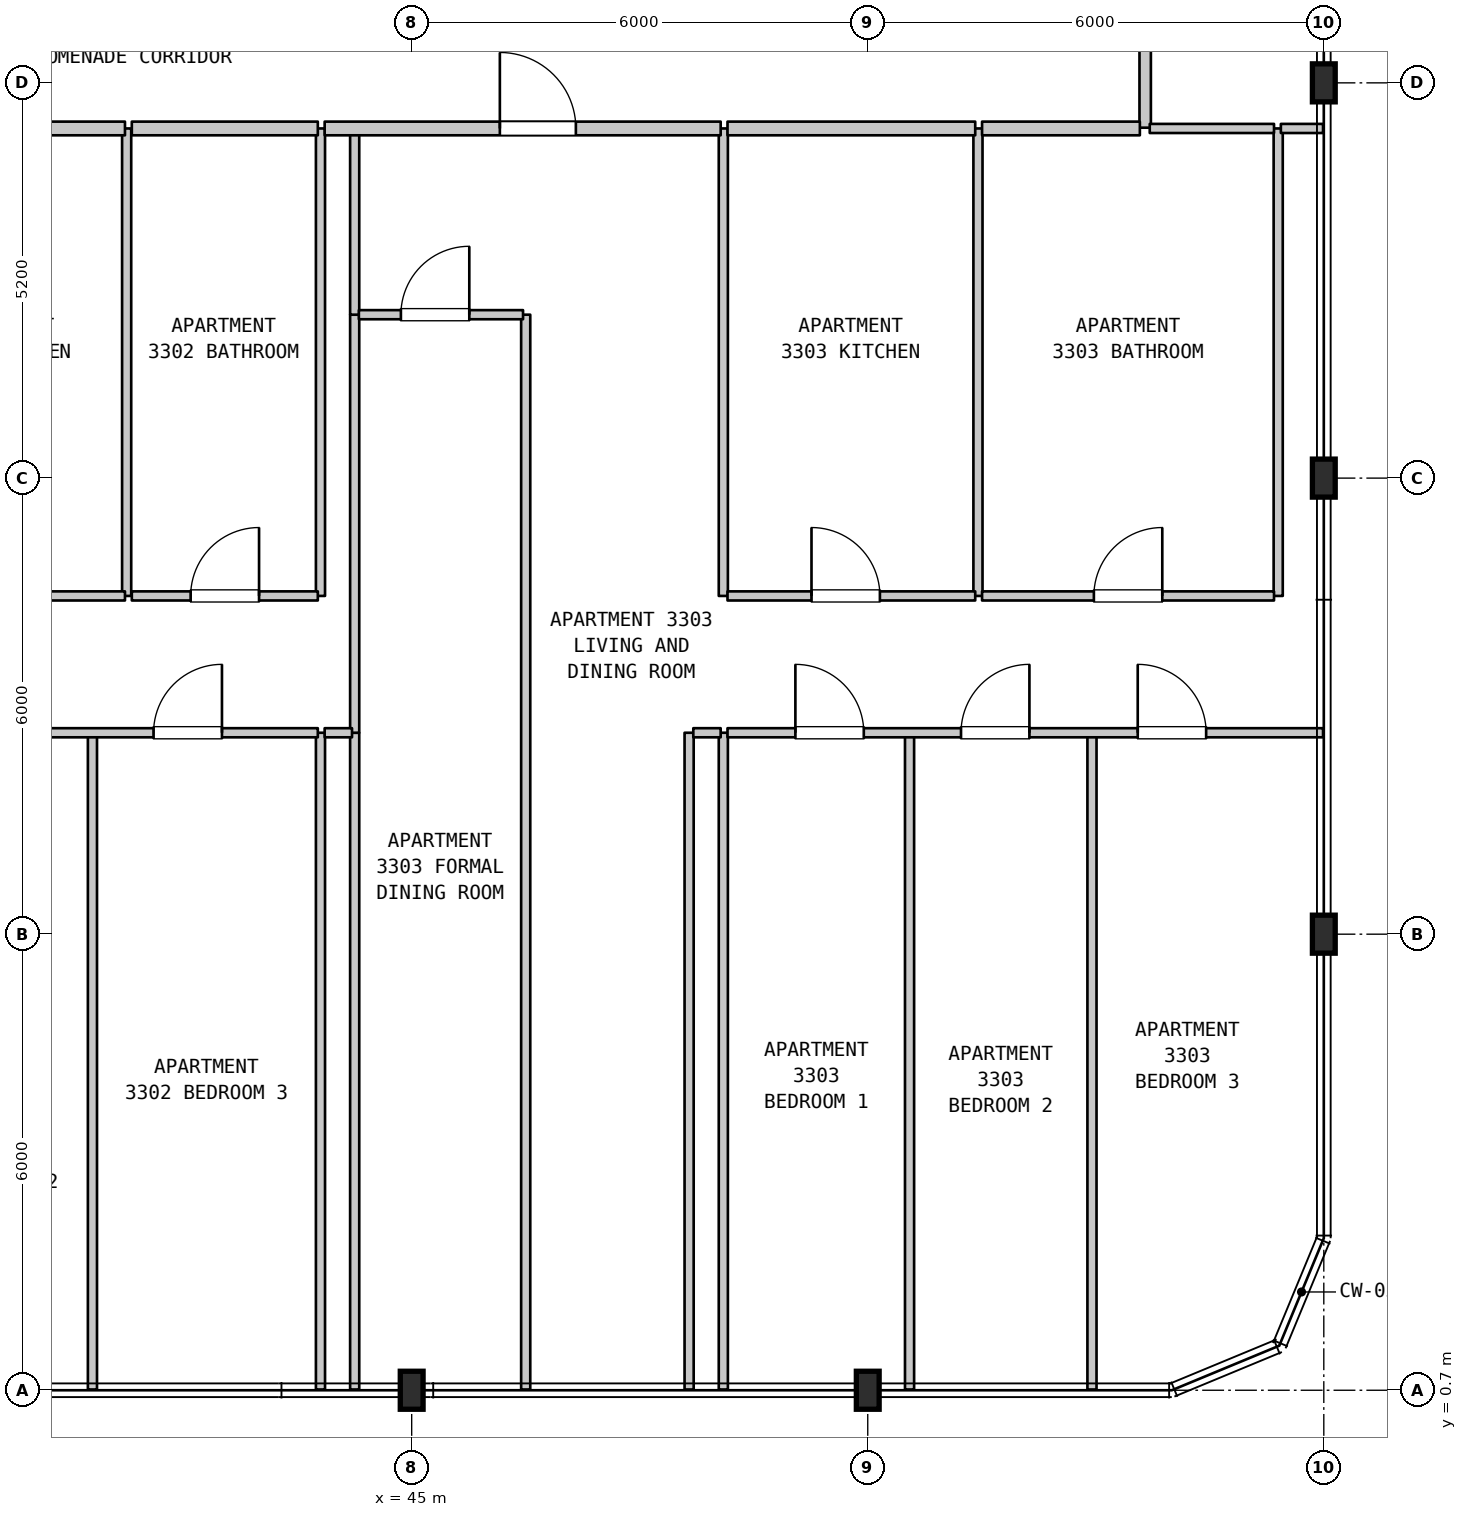
"""IFC4 building model, lengths in metres.
Left out: names, types, materials, properties, quantities, classifications, styles, units other than length and angle.
Written with IfcOpenShell. Run it as: python <this file> out.ifc"""

import sys

from ifc_helpers import new_model, si_unit, direction, frame, frame_2d, origin, origin_2d, place, context, subcontext, project, spatial, rectangle, i_section, extrude, element, fill, save


model = new_model("IFC4")
c1 = context("Model", 3, precision=1e-05, world=origin(), true_north=direction((0.0, 1.0)))
c2 = subcontext(c1, "Body", "Model", "MODEL_VIEW")
j1 = project(units=[si_unit("LENGTHUNIT", "METRE"), si_unit("PLANEANGLEUNIT", "RADIAN")], contexts=[c1])
p1 = place(None, origin())
s1 = spatial("IfcSite", under=j1, at=p1, CompositionType="ELEMENT")
p2 = place(p1, origin())
s2 = spatial("IfcBuilding", under=s1, at=p2, CompositionType="ELEMENT")
p3 = place(p2, frame((0.0, 0.0, 137.2)))
s3 = spatial("IfcBuildingStorey", under=s2, at=p3, CompositionType="ELEMENT", Elevation=137.2)
for number, where, z_axis, x_axis in (
    (1, (45.0, 0.7, 0.0), (0.0, 0.0, 1.0), (1.0, 0.0, 0.0)),
    (2, (51.0, 0.7, 0.0), (0.0, 0.0, 1.0), (1.0, 0.0, 0.0)),
    (3, (57.0, 6.7, 0.0), (0.0, 0.0, 1.0), (1.0, 0.0, 0.0)),
    (4, (57.0, 12.7, 0.0), (0.0, 0.0, 1.0), (1.0, 0.0, 0.0)),
    (5, (57.0, 17.9, 0.0), (0.0, 0.0, 1.0), (1.0, 0.0, 0.0)),
):
    element("IfcColumn", number, at=place(p3, frame(where, z_axis=z_axis, x_axis=x_axis)), inside=s3, PredefinedType="COLUMN", context=c2, shape_type="SweptSolid", body=[
        extrude(i_section(OverallWidth=0.3, OverallDepth=0.5, WebThickness=0.014, FlangeThickness=0.028, FilletRadius=0.027, at=origin_2d()), origin(), (0.0, 0.0, 1.0), 3.7),
    ])
p4 = place(p3, frame((40.8, 0.71, 0.0), z_axis=(0.0, 0.0, 1.0), x_axis=(0.0, 1.0, 0.0)))
e6 = element("IfcWall", 6, at=p4, inside=s3, PredefinedType="PARTITIONING", context=c2, shape_type="SweptSolid", body=[
    extrude(rectangle(XDim=8.64, YDim=0.12, at=frame_2d((4.32, 0.0))), origin(), (0.0, 0.0, 1.0), 3.385),
])
p5 = place(p3, frame((41.25, 11.15, 0.0), z_axis=(0.0, 0.0, 1.0), x_axis=(0.0, 1.0, 0.0)))
e7 = element("IfcWall", 7, at=p5, inside=s3, PredefinedType="PARTITIONING", context=c2, shape_type="SweptSolid", body=[
    extrude(rectangle(XDim=6.15, YDim=0.12, at=frame_2d((3.075, 0.0))), origin(), (0.0, 0.0, 1.0), 3.385),
])
p6 = place(p3, frame((43.8, 0.71, 0.0), z_axis=(0.0, 0.0, 1.0), x_axis=(0.0, 1.0, 0.0)))
e8 = element("IfcWall", 8, at=p6, inside=s3, PredefinedType="PARTITIONING", context=c2, shape_type="SweptSolid", body=[
    extrude(rectangle(XDim=8.64, YDim=0.12, at=frame_2d((4.32, 0.0))), origin(), (0.0, 0.0, 1.0), 3.385),
])
p7 = place(p3, frame((43.8, 11.15, 0.0), z_axis=(0.0, 0.0, 1.0), x_axis=(0.0, 1.0, 0.0)))
e9 = element("IfcWall", 9, at=p7, inside=s3, PredefinedType="PARTITIONING", context=c2, shape_type="SweptSolid", body=[
    extrude(rectangle(XDim=6.15, YDim=0.12, at=frame_2d((3.075, 0.0))), origin(), (0.0, 0.0, 1.0), 3.385),
])
p8 = place(p3, frame((44.25, 0.71, 0.0), z_axis=(0.0, 0.0, 1.0), x_axis=(0.0, 1.0, 0.0)))
e10 = element("IfcWall", 10, at=p8, inside=s3, PredefinedType="PARTITIONING", context=c2, shape_type="SweptSolid", body=[
    extrude(rectangle(XDim=8.64, YDim=0.12, at=frame_2d((4.32, 0.0))), origin(), (0.0, 0.0, 1.0), 3.385),
])
p9 = place(p3, frame((44.25, 9.35, 0.0), z_axis=(0.0, 0.0, 1.0), x_axis=(0.0, 1.0, 0.0)))
e11 = element("IfcWall", 11, at=p9, inside=s3, PredefinedType="PARTITIONING", context=c2, shape_type="SweptSolid", body=[
    extrude(rectangle(XDim=5.5, YDim=0.12, at=frame_2d((2.75, 0.0))), origin(), (0.0, 0.0, 1.0), 3.385),
])
p10 = place(p3, frame((44.25, 14.85, 0.0), z_axis=(0.0, 0.0, 1.0), x_axis=(0.0, 1.0, 0.0)))
e12 = element("IfcWall", 12, at=p10, inside=s3, PredefinedType="PARTITIONING", context=c2, shape_type="SweptSolid", body=[
    extrude(rectangle(XDim=2.45, YDim=0.12, at=frame_2d((1.225, 0.0))), origin(), (0.0, 0.0, 1.0), 3.385),
])
p11 = place(p3, frame((46.5, 0.71, 0.0), z_axis=(0.0, 0.0, 1.0), x_axis=(0.0, 1.0, 0.0)))
e13 = element("IfcWall", 13, at=p11, inside=s3, PredefinedType="PARTITIONING", context=c2, shape_type="SweptSolid", body=[
    extrude(rectangle(XDim=14.14, YDim=0.12, at=frame_2d((7.07, 0.0))), origin(), (0.0, 0.0, 1.0), 3.385),
])
for number, where, z_axis, x_axis in (
    (14, (48.65, 0.71, 0.0), (0.0, 0.0, 1.0), (0.0, 1.0, 0.0)),
    (15, (49.1, 0.71, 0.0), (0.0, 0.0, 1.0), (0.0, 1.0, 0.0)),
):
    element("IfcWall", number, at=place(p3, frame(where, z_axis=z_axis, x_axis=x_axis)), inside=s3, PredefinedType="PARTITIONING", context=c2, shape_type="SweptSolid", body=[
        extrude(rectangle(XDim=8.64, YDim=0.12, at=frame_2d((4.32, 0.0))), origin(), (0.0, 0.0, 1.0), 3.385),
    ])
p12 = place(p3, frame((49.1, 11.15, 0.0), z_axis=(0.0, 0.0, 1.0), x_axis=(0.0, 1.0, 0.0)))
e16 = element("IfcWall", 16, at=p12, inside=s3, PredefinedType="PARTITIONING", context=c2, shape_type="SweptSolid", body=[
    extrude(rectangle(XDim=6.15, YDim=0.12, at=frame_2d((3.075, 0.0))), origin(), (0.0, 0.0, 1.0), 3.385),
])
p13 = place(p3, frame((51.55, 0.71, 0.0), z_axis=(0.0, 0.0, 1.0), x_axis=(0.0, 1.0, 0.0)))
e17 = element("IfcWall", 17, at=p13, inside=s3, PredefinedType="PARTITIONING", context=c2, shape_type="SweptSolid", body=[
    extrude(rectangle(XDim=8.64, YDim=0.12, at=frame_2d((4.32, 0.0))), origin(), (0.0, 0.0, 1.0), 3.385),
])
p14 = place(p3, frame((52.45, 11.15, 0.0), z_axis=(0.0, 0.0, 1.0), x_axis=(0.0, 1.0, 0.0)))
e18 = element("IfcWall", 18, at=p14, inside=s3, PredefinedType="PARTITIONING", context=c2, shape_type="SweptSolid", body=[
    extrude(rectangle(XDim=6.15, YDim=0.12, at=frame_2d((3.075, 0.0))), origin(), (0.0, 0.0, 1.0), 3.385),
])
p15 = place(p3, frame((53.95, 0.71, 0.0), z_axis=(0.0, 0.0, 1.0), x_axis=(0.0, 1.0, 0.0)))
e19 = element("IfcWall", 19, at=p15, inside=s3, PredefinedType="PARTITIONING", context=c2, shape_type="SweptSolid", body=[
    extrude(rectangle(XDim=8.64, YDim=0.12, at=frame_2d((4.32, 0.0))), origin(), (0.0, 0.0, 1.0), 3.385),
])
p16 = place(p3, frame((54.65, 17.31, 0.0), z_axis=(0.0, 0.0, 1.0), x_axis=(0.0, 1.0, 0.0)))
e20 = element("IfcWall", 20, at=p16, inside=s3, PredefinedType="STANDARD", context=c2, shape_type="SweptSolid", body=[
    extrude(rectangle(XDim=2.19, YDim=0.15, at=frame_2d((1.095, 0.0))), origin(), (0.0, 0.0, 1.0), 3.385),
])
p17 = place(p3, frame((56.4, 11.15, 0.0), z_axis=(0.0, 0.0, 1.0), x_axis=(0.0, 1.0, 0.0)))
e21 = element("IfcWall", 21, at=p17, inside=s3, PredefinedType="PARTITIONING", context=c2, shape_type="SweptSolid", body=[
    extrude(rectangle(XDim=6.15, YDim=0.12, at=frame_2d((3.075, 0.0))), origin(), (0.0, 0.0, 1.0), 3.385),
])
p18 = place(p3, frame((34.795, 9.35, 0.0), z_axis=(0.0, 0.0, 1.0), x_axis=(1.0, 0.0, 0.0)))
e22 = element("IfcWall", 22, at=p18, inside=s3, PredefinedType="PARTITIONING", context=c2, shape_type="SweptSolid", body=[
    extrude(rectangle(XDim=8.97, YDim=0.12, at=frame_2d((4.485, 0.0))), origin(), (0.0, 0.0, 1.0), 3.385),
])
p19 = place(p18, frame((1.119, 0.0, 0.0)))
e23 = element("IfcOpeningElement", 23, at=p19, cuts=e22, PredefinedType="OPENING", context=c2, shape_type="SweptSolid", body=[
    extrude(rectangle(XDim=0.9, YDim=2.15, at=frame_2d((0.45, 1.075))), frame((0.0, 0.07, 0.0), z_axis=(0.0, -1.0, 0.0), x_axis=(1.0, 0.0, 0.0)), (0.0, 0.0, 1.0), 0.14),
])
p20 = place(p18, frame((3.962, 0.0, 0.0)))
e24 = element("IfcOpeningElement", 24, at=p20, cuts=e22, PredefinedType="OPENING", context=c2, shape_type="SweptSolid", body=[
    extrude(rectangle(XDim=0.9, YDim=2.15, at=frame_2d((0.45, 1.075))), frame((0.0, 0.07, 0.0), z_axis=(0.0, -1.0, 0.0), x_axis=(1.0, 0.0, 0.0)), (0.0, 0.0, 1.0), 0.14),
])
p21 = place(p18, frame((6.809, 0.0, 0.0)))
e25 = element("IfcOpeningElement", 25, at=p21, cuts=e22, PredefinedType="OPENING", context=c2, shape_type="SweptSolid", body=[
    extrude(rectangle(XDim=0.9, YDim=2.15, at=frame_2d((0.45, 1.075))), frame((0.0, 0.07, 0.0), z_axis=(0.0, -1.0, 0.0), x_axis=(1.0, 0.0, 0.0)), (0.0, 0.0, 1.0), 0.14),
])
p22 = place(p3, frame((43.855, 9.35, 0.0), z_axis=(0.0, 0.0, 1.0), x_axis=(1.0, 0.0, 0.0)))
e26 = element("IfcWall", 26, at=p22, inside=s3, PredefinedType="PARTITIONING", context=c2, shape_type="SweptSolid", body=[
    extrude(rectangle(XDim=0.36, YDim=0.12, at=frame_2d((0.18, 0.0))), origin(), (0.0, 0.0, 1.0), 3.385),
])
p23 = place(p3, frame((48.705, 9.35, 0.0), z_axis=(0.0, 0.0, 1.0), x_axis=(1.0, 0.0, 0.0)))
e27 = element("IfcWall", 27, at=p23, inside=s3, PredefinedType="PARTITIONING", context=c2, shape_type="SweptSolid", body=[
    extrude(rectangle(XDim=0.36, YDim=0.12, at=frame_2d((0.18, 0.0))), origin(), (0.0, 0.0, 1.0), 3.385),
])
p24 = place(p3, frame((49.155, 9.35, 0.0), z_axis=(0.0, 0.0, 1.0), x_axis=(1.0, 0.0, 0.0)))
e28 = element("IfcWall", 28, at=p24, inside=s3, PredefinedType="PARTITIONING", context=c2, shape_type="SweptSolid", body=[
    extrude(rectangle(XDim=7.835, YDim=0.12, at=frame_2d((3.917, 0.0))), origin(), (0.0, 0.0, 1.0), 3.385),
])
p25 = place(p24, frame((0.893, 0.0, 0.0)))
e29 = element("IfcOpeningElement", 29, at=p25, cuts=e28, PredefinedType="OPENING", context=c2, shape_type="SweptSolid", body=[
    extrude(rectangle(XDim=0.9, YDim=2.15, at=frame_2d((0.45, 1.075))), frame((0.0, 0.07, 0.0), z_axis=(0.0, -1.0, 0.0), x_axis=(1.0, 0.0, 0.0)), (0.0, 0.0, 1.0), 0.14),
])
p26 = place(p24, frame((3.072, 0.0, 0.0)))
e30 = element("IfcOpeningElement", 30, at=p26, cuts=e28, PredefinedType="OPENING", context=c2, shape_type="SweptSolid", body=[
    extrude(rectangle(XDim=0.9, YDim=2.15, at=frame_2d((0.45, 1.075))), frame((0.0, 0.07, 0.0), z_axis=(0.0, -1.0, 0.0), x_axis=(1.0, 0.0, 0.0)), (0.0, 0.0, 1.0), 0.14),
])
p27 = place(p24, frame((5.397, 0.0, 0.0)))
e31 = element("IfcOpeningElement", 31, at=p27, cuts=e28, PredefinedType="OPENING", context=c2, shape_type="SweptSolid", body=[
    extrude(rectangle(XDim=0.9, YDim=2.15, at=frame_2d((0.45, 1.075))), frame((0.0, 0.07, 0.0), z_axis=(0.0, -1.0, 0.0), x_axis=(1.0, 0.0, 0.0)), (0.0, 0.0, 1.0), 0.14),
])
p28 = place(p3, frame((37.995, 11.15, 0.0), z_axis=(0.0, 0.0, 1.0), x_axis=(1.0, 0.0, 0.0)))
e32 = element("IfcWall", 32, at=p28, inside=s3, PredefinedType="PARTITIONING", context=c2, shape_type="SweptSolid", body=[
    extrude(rectangle(XDim=3.233, YDim=0.12, at=frame_2d((1.616, 0.0))), origin(), (0.0, 0.0, 1.0), 3.385),
])
p29 = place(p28, frame((1.134, 0.0, 0.0)))
e33 = element("IfcOpeningElement", 33, at=p29, cuts=e32, PredefinedType="OPENING", context=c2, shape_type="SweptSolid", body=[
    extrude(rectangle(XDim=0.9, YDim=2.15, at=frame_2d((0.45, 1.075))), frame((0.0, 0.07, 0.0), z_axis=(0.0, -1.0, 0.0), x_axis=(1.0, 0.0, 0.0)), (0.0, 0.0, 1.0), 0.14),
])
p30 = place(p3, frame((41.318, 11.15, 0.0), z_axis=(0.0, 0.0, 1.0), x_axis=(1.0, 0.0, 0.0)))
e34 = element("IfcWall", 34, at=p30, inside=s3, PredefinedType="PARTITIONING", context=c2, shape_type="SweptSolid", body=[
    extrude(rectangle(XDim=2.447, YDim=0.12, at=frame_2d((1.223, 0.0))), origin(), (0.0, 0.0, 1.0), 3.385),
])
p31 = place(p30, frame((0.774, 0.0, 0.0)))
e35 = element("IfcOpeningElement", 35, at=p31, cuts=e34, PredefinedType="OPENING", context=c2, shape_type="SweptSolid", body=[
    extrude(rectangle(XDim=0.9, YDim=2.1, at=frame_2d((0.45, 1.05))), frame((0.0, 0.07, 0.0), z_axis=(0.0, -1.0, 0.0), x_axis=(1.0, 0.0, 0.0)), (0.0, 0.0, 1.0), 0.14),
])
p32 = place(p3, frame((49.155, 11.15, 0.0), z_axis=(0.0, 0.0, 1.0), x_axis=(1.0, 0.0, 0.0)))
e36 = element("IfcWall", 36, at=p32, inside=s3, PredefinedType="PARTITIONING", context=c2, shape_type="SweptSolid", body=[
    extrude(rectangle(XDim=3.259, YDim=0.12, at=frame_2d((1.629, 0.0))), origin(), (0.0, 0.0, 1.0), 3.385),
])
p33 = place(p32, frame((1.105, 0.0, 0.0)))
e37 = element("IfcOpeningElement", 37, at=p33, cuts=e36, PredefinedType="OPENING", context=c2, shape_type="SweptSolid", body=[
    extrude(rectangle(XDim=0.9, YDim=2.15, at=frame_2d((0.45, 1.075))), frame((0.0, 0.07, 0.0), z_axis=(0.0, -1.0, 0.0), x_axis=(1.0, 0.0, 0.0)), (0.0, 0.0, 1.0), 0.14),
])
p34 = place(p3, frame((52.504, 11.15, 0.0), z_axis=(0.0, 0.0, 1.0), x_axis=(1.0, 0.0, 0.0)))
e38 = element("IfcWall", 38, at=p34, inside=s3, PredefinedType="PARTITIONING", context=c2, shape_type="SweptSolid", body=[
    extrude(rectangle(XDim=3.841, YDim=0.12, at=frame_2d((1.92, 0.0))), origin(), (0.0, 0.0, 1.0), 3.385),
])
p35 = place(p34, frame((1.471, 0.0, 0.0)))
e39 = element("IfcOpeningElement", 39, at=p35, cuts=e38, PredefinedType="OPENING", context=c2, shape_type="SweptSolid", body=[
    extrude(rectangle(XDim=0.9, YDim=2.1, at=frame_2d((0.45, 1.05))), frame((0.0, 0.07, 0.0), z_axis=(0.0, -1.0, 0.0), x_axis=(1.0, 0.0, 0.0)), (0.0, 0.0, 1.0), 0.14),
])
p36 = place(p3, frame((44.305, 14.85, 0.0), z_axis=(0.0, 0.0, 1.0), x_axis=(1.0, 0.0, 0.0)))
e40 = element("IfcWall", 40, at=p36, inside=s3, PredefinedType="PARTITIONING", context=c2, shape_type="SweptSolid", body=[
    extrude(rectangle(XDim=2.16, YDim=0.12, at=frame_2d((1.08, 0.0))), origin(), (0.0, 0.0, 1.0), 3.385),
])
p37 = place(p36, frame((0.553, 0.0, 0.0)))
e41 = element("IfcOpeningElement", 41, at=p37, cuts=e40, PredefinedType="OPENING", context=c2, shape_type="SweptSolid", body=[
    extrude(rectangle(XDim=0.9, YDim=2.15, at=frame_2d((0.45, 1.075))), frame((0.0, 0.07, 0.0), z_axis=(0.0, -1.0, 0.0), x_axis=(1.0, 0.0, 0.0)), (0.0, 0.0, 1.0), 0.14),
])
p38 = place(p3, frame((37.995, 17.3, 0.0), z_axis=(0.0, 0.0, 1.0), x_axis=(1.0, 0.0, 0.0)))
e42 = element("IfcWall", 42, at=p38, inside=s3, PredefinedType="STANDARD", context=c2, shape_type="SweptSolid", body=[
    extrude(rectangle(XDim=3.233, YDim=0.18, at=frame_2d((1.616, 0.0))), origin(), (0.0, 0.0, 1.0), 3.385),
])
p39 = place(p3, frame((41.318, 17.3, 0.0), z_axis=(0.0, 0.0, 1.0), x_axis=(1.0, 0.0, 0.0)))
e43 = element("IfcWall", 43, at=p39, inside=s3, PredefinedType="STANDARD", context=c2, shape_type="SweptSolid", body=[
    extrude(rectangle(XDim=2.447, YDim=0.18, at=frame_2d((1.223, 0.0))), origin(), (0.0, 0.0, 1.0), 3.385),
])
p40 = place(p3, frame((43.855, 17.3, 0.0), z_axis=(0.0, 0.0, 1.0), x_axis=(1.0, 0.0, 0.0)))
e44 = element("IfcWall", 44, at=p40, inside=s3, PredefinedType="STANDARD", context=c2, shape_type="SweptSolid", body=[
    extrude(rectangle(XDim=5.21, YDim=0.18, at=frame_2d((2.605, 0.0))), origin(), (0.0, 0.0, 1.0), 3.385),
])
p41 = place(p40, frame((2.305, 0.0, 0.0)))
e45 = element("IfcOpeningElement", 45, at=p41, cuts=e44, PredefinedType="OPENING", context=c2, shape_type="SweptSolid", body=[
    extrude(rectangle(XDim=1.0, YDim=2.15, at=frame_2d((0.5, 1.075))), frame((0.0, 0.1, 0.0), z_axis=(0.0, -1.0, 0.0), x_axis=(1.0, 0.0, 0.0)), (0.0, 0.0, 1.0), 0.2),
])
p42 = place(p3, frame((49.155, 17.3, 0.0), z_axis=(0.0, 0.0, 1.0), x_axis=(1.0, 0.0, 0.0)))
e46 = element("IfcWall", 46, at=p42, inside=s3, PredefinedType="STANDARD", context=c2, shape_type="SweptSolid", body=[
    extrude(rectangle(XDim=3.259, YDim=0.18, at=frame_2d((1.629, 0.0))), origin(), (0.0, 0.0, 1.0), 3.385),
])
p43 = place(p3, frame((52.504, 17.3, 0.0), z_axis=(0.0, 0.0, 1.0), x_axis=(1.0, 0.0, 0.0)))
e47 = element("IfcWall", 47, at=p43, inside=s3, PredefinedType="STANDARD", context=c2, shape_type="SweptSolid", body=[
    extrude(rectangle(XDim=2.076, YDim=0.18, at=frame_2d((1.038, 0.0))), origin(), (0.0, 0.0, 1.0), 3.385),
])
p44 = place(p3, frame((54.71, 17.3, 0.0), z_axis=(0.0, 0.0, 1.0), x_axis=(1.0, 0.0, 0.0)))
e48 = element("IfcWall", 48, at=p44, inside=s3, PredefinedType="PARTITIONING", context=c2, shape_type="SweptSolid", body=[
    extrude(rectangle(XDim=1.635, YDim=0.12, at=frame_2d((0.817, 0.0))), origin(), (0.0, 0.0, 1.0), 3.385),
])
p45 = place(p3, frame((56.435, 17.3, 0.0), z_axis=(0.0, 0.0, 1.0), x_axis=(1.0, 0.0, 0.0)))
e49 = element("IfcWall", 49, at=p45, inside=s3, PredefinedType="PARTITIONING", context=c2, shape_type="SweptSolid", body=[
    extrude(rectangle(XDim=0.555, YDim=0.12, at=frame_2d((0.277, 0.0))), origin(), (0.0, 0.0, 1.0), 3.385),
])
p46 = place(p21, origin())
e50 = element("IfcDoor", 50, at=p46, inside=s3, OperationType="SINGLE_SWING_RIGHT", PredefinedType="DOOR", context=c2, shape_type="SweptSolid", body=[
    extrude(rectangle(XDim=0.9, YDim=2.15, at=frame_2d((0.45, 1.075))), frame((0.0, 0.025, 0.0), z_axis=(0.0, -1.0, 0.0), x_axis=(1.0, 0.0, 0.0)), (0.0, 0.0, 1.0), 0.05),
])
fill(e25, e50)
p47 = place(p25, origin())
e51 = element("IfcDoor", 51, at=p47, inside=s3, OperationType="SINGLE_SWING_LEFT", PredefinedType="DOOR", context=c2, shape_type="SweptSolid", body=[
    extrude(rectangle(XDim=0.9, YDim=2.15, at=frame_2d((0.45, 1.075))), frame((0.0, 0.025, 0.0), z_axis=(0.0, -1.0, 0.0), x_axis=(1.0, 0.0, 0.0)), (0.0, 0.0, 1.0), 0.05),
])
fill(e29, e51)
p48 = place(p26, origin())
e52 = element("IfcDoor", 52, at=p48, inside=s3, OperationType="SINGLE_SWING_RIGHT", PredefinedType="DOOR", context=c2, shape_type="SweptSolid", body=[
    extrude(rectangle(XDim=0.9, YDim=2.15, at=frame_2d((0.45, 1.075))), frame((0.0, 0.025, 0.0), z_axis=(0.0, -1.0, 0.0), x_axis=(1.0, 0.0, 0.0)), (0.0, 0.0, 1.0), 0.05),
])
fill(e30, e52)
p49 = place(p27, origin())
e53 = element("IfcDoor", 53, at=p49, inside=s3, OperationType="SINGLE_SWING_LEFT", PredefinedType="DOOR", context=c2, shape_type="SweptSolid", body=[
    extrude(rectangle(XDim=0.9, YDim=2.15, at=frame_2d((0.45, 1.075))), frame((0.0, 0.025, 0.0), z_axis=(0.0, -1.0, 0.0), x_axis=(1.0, 0.0, 0.0)), (0.0, 0.0, 1.0), 0.05),
])
fill(e31, e53)
p50 = place(p31, origin())
e54 = element("IfcDoor", 54, at=p50, inside=s3, OperationType="SINGLE_SWING_RIGHT", PredefinedType="DOOR", context=c2, shape_type="SweptSolid", body=[
    extrude(rectangle(XDim=0.9, YDim=2.1, at=frame_2d((0.45, 1.05))), frame((0.0, 0.025, 0.0), z_axis=(0.0, -1.0, 0.0), x_axis=(1.0, 0.0, 0.0)), (0.0, 0.0, 1.0), 0.05),
])
fill(e35, e54)
p51 = place(p33, origin())
e55 = element("IfcDoor", 55, at=p51, inside=s3, OperationType="SINGLE_SWING_LEFT", PredefinedType="DOOR", context=c2, shape_type="SweptSolid", body=[
    extrude(rectangle(XDim=0.9, YDim=2.15, at=frame_2d((0.45, 1.075))), frame((0.0, 0.025, 0.0), z_axis=(0.0, -1.0, 0.0), x_axis=(1.0, 0.0, 0.0)), (0.0, 0.0, 1.0), 0.05),
])
fill(e37, e55)
p52 = place(p35, origin())
e56 = element("IfcDoor", 56, at=p52, inside=s3, OperationType="SINGLE_SWING_RIGHT", PredefinedType="DOOR", context=c2, shape_type="SweptSolid", body=[
    extrude(rectangle(XDim=0.9, YDim=2.1, at=frame_2d((0.45, 1.05))), frame((0.0, 0.025, 0.0), z_axis=(0.0, -1.0, 0.0), x_axis=(1.0, 0.0, 0.0)), (0.0, 0.0, 1.0), 0.05),
])
fill(e39, e56)
p53 = place(p37, origin())
e57 = element("IfcDoor", 57, at=p53, inside=s3, OperationType="SINGLE_SWING_RIGHT", PredefinedType="DOOR", context=c2, shape_type="SweptSolid", body=[
    extrude(rectangle(XDim=0.9, YDim=2.15, at=frame_2d((0.45, 1.075))), frame((0.0, 0.025, 0.0), z_axis=(0.0, -1.0, 0.0), x_axis=(1.0, 0.0, 0.0)), (0.0, 0.0, 1.0), 0.05),
])
fill(e41, e57)
p54 = place(p41, origin())
e58 = element("IfcDoor", 58, at=p54, inside=s3, OperationType="SINGLE_SWING_LEFT", PredefinedType="DOOR", context=c2, shape_type="SweptSolid", body=[
    extrude(rectangle(XDim=1.0, YDim=2.15, at=frame_2d((0.5, 1.075))), frame((0.0, 0.025, 0.0), z_axis=(0.0, -1.0, 0.0), x_axis=(1.0, 0.0, 0.0)), (0.0, 0.0, 1.0), 0.05),
])
fill(e45, e58)
save(model, sys.argv[1])
